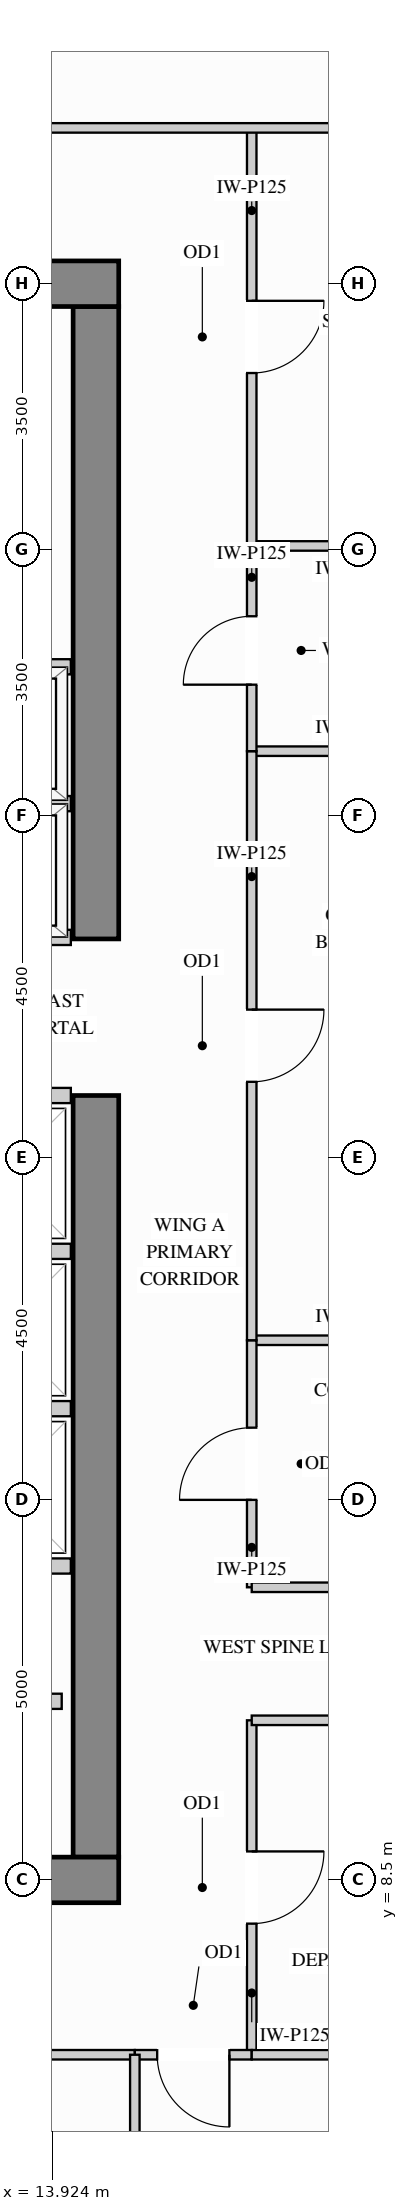
"""IFC4 building model, lengths in metres.
Left out: names, types, materials, properties, quantities, classifications, styles, units other than length and angle.
Written with IfcOpenShell. Run it as: python <this file> out.ifc"""

import sys

from ifc_helpers import new_model, si_unit, direction, frame, frame_2d, origin, place, context, subcontext, project, spatial, rectangle, extrude, source, transform, mapped, element, fill, save


model = new_model("IFC4")
c1 = context("Model", 3, precision=1e-05, world=origin(), true_north=direction((0.0, 1.0)))
c2 = subcontext(c1, "Body", "Model", "MODEL_VIEW")
j1 = project(units=[si_unit("LENGTHUNIT", "METRE"), si_unit("PLANEANGLEUNIT", "RADIAN")], contexts=[c1])
p1 = place(None, origin())
s1 = spatial("IfcSite", under=j1, at=p1, CompositionType="ELEMENT")
p2 = place(p1, origin())
s2 = spatial("IfcBuilding", under=s1, at=p2, CompositionType="ELEMENT")
p3 = place(p2, frame((0.0, 0.0, 204.3)))
s3 = spatial("IfcBuildingStorey", under=s2, at=p3, CompositionType="ELEMENT", Elevation=204.3)
m1 = source(origin(), c2, "Body", "SweptSolid", [
    extrude(rectangle(XDim=10.02, YDim=0.6, at=frame_2d((5.01, 0.0))), origin(), (0.0, 0.0, 1.0), 3.32),
])
p4 = place(p3, frame((14.5, 8.8, 0.0), z_axis=(0.0, 0.0, 1.0), x_axis=(0.0, 1.0, 0.0)))
e1 = element("IfcWall", 1, at=p4, inside=s3, PredefinedType="SHEAR", context=c2, shape_type="MappedRepresentation", body=[
    mapped(m1, transform((0.0, 0.0, 0.0), x_axis=(1.0, 0.0, 0.0), y_axis=(0.0, 1.0, 0.0), z_axis=(0.0, 0.0, 1.0))),
])
m2 = source(origin(), c2, "Body", "SweptSolid", [
    extrude(rectangle(XDim=8.32, YDim=0.6, at=frame_2d((4.16, 0.0))), origin(), (0.0, 0.0, 1.0), 3.32),
])
p5 = place(p3, frame((14.5, 20.88, 0.0), z_axis=(0.0, 0.0, 1.0), x_axis=(0.0, 1.0, 0.0)))
e2 = element("IfcWall", 2, at=p5, inside=s3, PredefinedType="SHEAR", context=c2, shape_type="MappedRepresentation", body=[
    mapped(m2, transform((0.0, 0.0, 0.0), x_axis=(1.0, 0.0, 0.0), y_axis=(0.0, 1.0, 0.0), z_axis=(0.0, 0.0, 1.0))),
])
m3 = source(origin(), c2, "Body", "SweptSolid", [
    extrude(rectangle(XDim=10.6, YDim=0.6, at=frame_2d((5.3, 0.0))), origin(), (0.0, 0.0, 1.0), 3.32),
])
for number, where, z_axis, x_axis in (
    (3, (4.2, 29.5, 0.0), (0.0, 0.0, 1.0), (1.0, 0.0, 0.0)),
    (4, (4.2, 8.5, 0.0), (0.0, 0.0, 1.0), (1.0, 0.0, 0.0)),
):
    element("IfcWall", number, at=place(p3, frame(where, z_axis=z_axis, x_axis=x_axis)), inside=s3, PredefinedType="SHEAR", context=c2, shape_type="MappedRepresentation", body=[
        mapped(m3, transform((0.0, 0.0, 0.0), x_axis=(1.0, 0.0, 0.0), y_axis=(0.0, 1.0, 0.0), z_axis=(0.0, 0.0, 1.0))),
    ])
m4 = source(origin(), c2, "Body", "SweptSolid", [
    extrude(rectangle(XDim=2.6, YDim=0.125, at=frame_2d((1.3, 0.0))), origin(), (0.0, 0.0, 1.0), 3.305),
])
p6 = place(p3, frame((16.55, 15.6, 0.0), z_axis=(0.0, 0.0, 1.0), x_axis=(1.0, 0.0, 0.0)))
e5 = element("IfcWall", 5, at=p6, inside=s3, PredefinedType="PARTITIONING", context=c2, shape_type="MappedRepresentation", body=[
    mapped(m4, transform((0.0, 0.0, 0.0), x_axis=(1.0, 0.0, 0.0), y_axis=(0.0, 1.0, 0.0), z_axis=(0.0, 0.0, 1.0))),
])
m5 = source(origin(), c2, "Body", "SweptSolid", [
    extrude(rectangle(XDim=2.598, YDim=0.125, at=frame_2d((1.299, 0.0))), origin(), (0.0, 0.0, 1.0), 3.305),
])
for number, where, z_axis, x_axis in (
    (6, (16.55, 23.35, 0.0), (0.0, 0.0, 1.0), (1.0, 0.0, 0.0)),
    (7, (16.55, 26.05, 0.0), (0.0, 0.0, 1.0), (1.0, 0.0, 0.0)),
):
    element("IfcWall", number, at=place(p3, frame(where, z_axis=z_axis, x_axis=x_axis)), inside=s3, PredefinedType="PARTITIONING", context=c2, shape_type="MappedRepresentation", body=[
        mapped(m5, transform((0.0, 0.0, 0.0), x_axis=(1.0, 0.0, 0.0), y_axis=(0.0, 1.0, 0.0), z_axis=(0.0, 0.0, 1.0))),
    ])
p7 = place(p3, frame((16.55, 12.35, 0.0), z_axis=(0.0, 0.0, 1.0), x_axis=(0.0, 1.0, 0.0)))
e8 = element("IfcWall", 8, at=p7, inside=s3, PredefinedType="PARTITIONING", context=c2, shape_type="SweptSolid", body=[
    extrude(rectangle(XDim=3.25, YDim=0.125, at=frame_2d((1.625, 0.0))), origin(), (0.0, 0.0, 1.0), 3.305),
])
p8 = place(p7, frame((1.15, 0.0, 0.0)))
e9 = element("IfcOpeningElement", 9, at=p8, cuts=e8, PredefinedType="OPENING", context=c2, shape_type="SweptSolid", body=[
    extrude(rectangle(XDim=0.95, YDim=2.15, at=frame_2d((0.475, 1.075))), frame((0.0, 0.073, 0.0), z_axis=(0.0, -1.0, 0.0), x_axis=(1.0, 0.0, 0.0)), (0.0, 0.0, 1.0), 0.145),
])
p9 = place(p3, frame((16.55, 15.6, 0.0), z_axis=(0.0, 0.0, 1.0), x_axis=(0.0, 1.0, 0.0)))
e10 = element("IfcWall", 10, at=p9, inside=s3, PredefinedType="PARTITIONING", context=c2, shape_type="SweptSolid", body=[
    extrude(rectangle(XDim=7.75, YDim=0.125, at=frame_2d((3.875, 0.0))), origin(), (0.0, 0.0, 1.0), 3.305),
])
p10 = place(p9, frame((3.4, 0.0, 0.0)))
e11 = element("IfcOpeningElement", 11, at=p10, cuts=e10, PredefinedType="OPENING", context=c2, shape_type="SweptSolid", body=[
    extrude(rectangle(XDim=0.95, YDim=2.15, at=frame_2d((0.475, 1.075))), frame((0.0, 0.073, 0.0), z_axis=(0.0, -1.0, 0.0), x_axis=(1.0, 0.0, 0.0)), (0.0, 0.0, 1.0), 0.145),
])
p11 = place(p3, frame((16.55, 26.05, 0.0), z_axis=(0.0, 0.0, 1.0), x_axis=(0.0, 1.0, 0.0)))
e12 = element("IfcWall", 12, at=p11, inside=s3, PredefinedType="PARTITIONING", context=c2, shape_type="SweptSolid", body=[
    extrude(rectangle(XDim=5.5, YDim=0.125, at=frame_2d((2.75, 0.0))), origin(), (0.0, 0.0, 1.0), 3.305),
])
p12 = place(p11, frame((2.275, 0.0, 0.0)))
e13 = element("IfcOpeningElement", 13, at=p12, cuts=e12, PredefinedType="OPENING", context=c2, shape_type="SweptSolid", body=[
    extrude(rectangle(XDim=0.95, YDim=2.15, at=frame_2d((0.475, 1.075))), frame((0.0, 0.073, 0.0), z_axis=(0.0, -1.0, 0.0), x_axis=(1.0, 0.0, 0.0)), (0.0, 0.0, 1.0), 0.145),
])
p13 = place(p3, frame((16.55, 6.2, 0.0), z_axis=(0.0, 0.0, 1.0), x_axis=(0.0, 1.0, 0.0)))
e14 = element("IfcWall", 14, at=p13, inside=s3, PredefinedType="PARTITIONING", context=c2, shape_type="SweptSolid", body=[
    extrude(rectangle(XDim=4.4, YDim=0.125, at=frame_2d((2.2, 0.0))), origin(), (0.0, 0.0, 1.0), 3.305),
])
p14 = place(p13, frame((1.725, 0.0, 0.0)))
e15 = element("IfcOpeningElement", 15, at=p14, cuts=e14, PredefinedType="OPENING", context=c2, shape_type="SweptSolid", body=[
    extrude(rectangle(XDim=0.95, YDim=2.15, at=frame_2d((0.475, 1.075))), frame((0.0, 0.073, 0.0), z_axis=(0.0, -1.0, 0.0), x_axis=(1.0, 0.0, 0.0)), (0.0, 0.0, 1.0), 0.145),
])
p15 = place(p3, frame((16.55, 23.35, 0.0), z_axis=(0.0, 0.0, 1.0), x_axis=(0.0, 1.0, 0.0)))
e16 = element("IfcWall", 16, at=p15, inside=s3, PredefinedType="PARTITIONING", context=c2, shape_type="SweptSolid", body=[
    extrude(rectangle(XDim=2.7, YDim=0.125, at=frame_2d((1.35, 0.0))), origin(), (0.0, 0.0, 1.0), 3.305),
])
p16 = place(p15, frame((0.875, 0.0, 0.0)))
e17 = element("IfcOpeningElement", 17, at=p16, cuts=e16, PredefinedType="OPENING", context=c2, shape_type="SweptSolid", body=[
    extrude(rectangle(XDim=0.9, YDim=2.15, at=frame_2d((0.45, 1.075))), frame((0.0, 0.073, 0.0), z_axis=(0.0, -1.0, 0.0), x_axis=(1.0, 0.0, 0.0)), (0.0, 0.0, 1.0), 0.145),
])
m6 = source(origin(), c2, "Body", "SweptSolid", [
    extrude(rectangle(XDim=12.598, YDim=0.125, at=frame_2d((6.299, 0.0))), origin(), (0.0, 0.0, 1.0), 3.305),
])
p17 = place(p3, frame((6.55, 31.55, 0.0), z_axis=(0.0, 0.0, 1.0), x_axis=(1.0, 0.0, 0.0)))
e18 = element("IfcWall", 18, at=p17, inside=s3, PredefinedType="PARTITIONING", context=c2, shape_type="MappedRepresentation", body=[
    mapped(m6, transform((0.0, 0.0, 0.0), x_axis=(1.0, 0.0, 0.0), y_axis=(0.0, 1.0, 0.0), z_axis=(0.0, 0.0, 1.0))),
])
m7 = source(origin(), c2, "Body", "SweptSolid", [
    extrude(rectangle(XDim=2.95, YDim=0.125, at=frame_2d((1.475, 0.0))), origin(), (0.0, 0.0, 1.0), 3.305),
])
for number, where, z_axis, x_axis in (
    (19, (16.55, 12.35, 0.0), (0.0, 0.0, 1.0), (1.0, 0.0, 0.0)),
    (20, (16.55, 10.6, 0.0), (0.0, 0.0, 1.0), (1.0, 0.0, 0.0)),
):
    element("IfcWall", number, at=place(p3, frame(where, z_axis=z_axis, x_axis=x_axis)), inside=s3, PredefinedType="PARTITIONING", context=c2, shape_type="MappedRepresentation", body=[
        mapped(m7, transform((0.0, 0.0, 0.0), x_axis=(1.0, 0.0, 0.0), y_axis=(0.0, 1.0, 0.0), z_axis=(0.0, 0.0, 1.0))),
    ])
p18 = place(p3, frame((10.875, 6.2, 0.0), z_axis=(0.0, 0.0, 1.0), x_axis=(1.0, 0.0, 0.0)))
e21 = element("IfcWall", 21, at=p18, inside=s3, PredefinedType="PARTITIONING", context=c2, shape_type="SweptSolid", body=[
    extrude(rectangle(XDim=4.137, YDim=0.125, at=frame_2d((2.068, 0.0))), origin(), (0.0, 0.0, 1.0), 2.768),
])
p19 = place(p18, frame((1.594, 0.0, 0.0)))
e22 = element("IfcOpeningElement", 22, at=p19, cuts=e21, PredefinedType="OPENING", context=c2, shape_type="SweptSolid", body=[
    extrude(rectangle(XDim=0.95, YDim=2.15, at=frame_2d((0.475, 1.075))), frame((0.0, 0.073, 0.0), z_axis=(0.0, -1.0, 0.0), x_axis=(1.0, 0.0, 0.0)), (0.0, 0.0, 1.0), 0.145),
])
p20 = place(p3, frame((15.012, 6.2, 0.0), z_axis=(0.0, 0.0, 1.0), x_axis=(1.0, 0.0, 0.0)))
e23 = element("IfcWall", 23, at=p20, inside=s3, PredefinedType="PARTITIONING", context=c2, shape_type="SweptSolid", body=[
    extrude(rectangle(XDim=1.538, YDim=0.125, at=frame_2d((0.769, 0.0))), origin(), (0.0, 0.0, 1.0), 2.768),
])
p21 = place(p20, frame((0.294, 0.0, 0.0)))
e24 = element("IfcOpeningElement", 24, at=p21, cuts=e23, PredefinedType="OPENING", context=c2, shape_type="SweptSolid", body=[
    extrude(rectangle(XDim=0.95, YDim=2.15, at=frame_2d((0.475, 1.075))), frame((0.0, 0.073, 0.0), z_axis=(0.0, -1.0, 0.0), x_axis=(1.0, 0.0, 0.0)), (0.0, 0.0, 1.0), 0.145),
])
m8 = source(origin(), c2, "Body", "SweptSolid", [
    extrude(rectangle(XDim=2.598, YDim=0.125, at=frame_2d((1.299, 0.0))), origin(), (0.0, 0.0, 1.0), 2.768),
])
p22 = place(p3, frame((16.55, 6.2, 0.0), z_axis=(0.0, 0.0, 1.0), x_axis=(1.0, 0.0, 0.0)))
e25 = element("IfcWall", 25, at=p22, inside=s3, PredefinedType="PARTITIONING", context=c2, shape_type="MappedRepresentation", body=[
    mapped(m8, transform((0.0, 0.0, 0.0), x_axis=(1.0, 0.0, 0.0), y_axis=(0.0, 1.0, 0.0), z_axis=(0.0, 0.0, 1.0))),
])
m9 = source(origin(), c2, "Body", "SweptSolid", [
    extrude(rectangle(XDim=5.08, YDim=0.125, at=frame_2d((2.54, 0.0))), origin(), (0.0, 0.0, 1.0), 3.305),
])
p23 = place(p3, frame((15.012, 1.12, 0.0), z_axis=(0.0, 0.0, 1.0), x_axis=(0.0, 1.0, 0.0)))
e26 = element("IfcWall", 26, at=p23, inside=s3, PredefinedType="PARTITIONING", context=c2, shape_type="MappedRepresentation", body=[
    mapped(m9, transform((0.0, 0.0, 0.0), x_axis=(1.0, 0.0, 0.0), y_axis=(0.0, 1.0, 0.0), z_axis=(0.0, 0.0, 1.0))),
])
m10 = source(origin(), c2, "Body", "SweptSolid", [
    extrude(rectangle(XDim=1.63, YDim=0.2, at=frame_2d((0.815, 0.0))), origin(), (0.0, 0.0, 1.0), 3.305),
])
p24 = place(p3, frame((12.42, 10.85, 0.0), z_axis=(0.0, 0.0, 1.0), x_axis=(1.0, 0.0, 0.0)))
e27 = element("IfcWall", 27, at=p24, inside=s3, PredefinedType="PARTITIONING", context=c2, shape_type="MappedRepresentation", body=[
    mapped(m10, transform((0.0, 0.0, 0.0), x_axis=(1.0, 0.0, 0.0), y_axis=(0.0, 1.0, 0.0), z_axis=(0.0, 0.0, 1.0))),
])
m11 = source(origin(), c2, "Body", "SweptSolid", [
    extrude(rectangle(XDim=2.34, YDim=0.2, at=frame_2d((1.17, 0.0))), origin(), (0.0, 0.0, 1.0), 3.305),
])
for number, where, z_axis, x_axis in (
    (28, (11.83, 22.66, 0.0), (0.0, 0.0, 1.0), (1.0, 0.0, 0.0)),
    (29, (11.83, 20.9, 0.0), (0.0, 0.0, 1.0), (1.0, 0.0, 0.0)),
    (30, (11.83, 24.46, 0.0), (0.0, 0.0, 1.0), (1.0, 0.0, 0.0)),
):
    element("IfcWall", number, at=place(p3, frame(where, z_axis=z_axis, x_axis=x_axis)), inside=s3, PredefinedType="PARTITIONING", context=c2, shape_type="MappedRepresentation", body=[
        mapped(m11, transform((0.0, 0.0, 0.0), x_axis=(1.0, 0.0, 0.0), y_axis=(0.0, 1.0, 0.0), z_axis=(0.0, 0.0, 1.0))),
    ])
m12 = source(origin(), c2, "Body", "SweptSolid", [
    extrude(rectangle(XDim=1.94, YDim=0.2, at=frame_2d((0.97, 0.0))), origin(), (0.0, 0.0, 1.0), 3.305),
])
for number, where, z_axis, x_axis in (
    (31, (12.23, 14.7, 0.0), (0.0, 0.0, 1.0), (1.0, 0.0, 0.0)),
    (32, (12.23, 12.63, 0.0), (0.0, 0.0, 1.0), (1.0, 0.0, 0.0)),
    (33, (12.23, 16.77, 0.0), (0.0, 0.0, 1.0), (1.0, 0.0, 0.0)),
    (34, (12.23, 18.82, 0.0), (0.0, 0.0, 1.0), (1.0, 0.0, 0.0)),
):
    element("IfcWall", number, at=place(p3, frame(where, z_axis=z_axis, x_axis=x_axis)), inside=s3, PredefinedType="PARTITIONING", context=c2, shape_type="MappedRepresentation", body=[
        mapped(m12, transform((0.0, 0.0, 0.0), x_axis=(1.0, 0.0, 0.0), y_axis=(0.0, 1.0, 0.0), z_axis=(0.0, 0.0, 1.0))),
    ])
m13 = source(origin(), c2, "Body", "SweptSolid", [
    extrude(rectangle(XDim=0.95, YDim=2.15, at=frame_2d((0.475, 1.075))), frame((0.0, 0.025, 0.0), z_axis=(0.0, -1.0, 0.0), x_axis=(1.0, 0.0, 0.0)), (0.0, 0.0, 1.0), 0.05),
])
p25 = place(p14, origin())
e35 = element("IfcDoor", 35, at=p25, inside=s3, OperationType="SINGLE_SWING_RIGHT", PredefinedType="DOOR", context=c2, shape_type="MappedRepresentation", body=[
    mapped(m13, transform((0.0, 0.0, 0.0), x_axis=(1.0, 0.0, 0.0), y_axis=(0.0, 1.0, 0.0), z_axis=(0.0, 0.0, 1.0))),
])
fill(e15, e35)
p26 = place(p8, origin())
e36 = element("IfcDoor", 36, at=p26, inside=s3, OperationType="SINGLE_SWING_LEFT", PredefinedType="DOOR", context=c2, shape_type="MappedRepresentation", body=[
    mapped(m13, transform((0.0, 0.0, 0.0), x_axis=(1.0, 0.0, 0.0), y_axis=(0.0, 1.0, 0.0), z_axis=(0.0, 0.0, 1.0))),
])
fill(e9, e36)
p27 = place(p10, origin())
e37 = element("IfcDoor", 37, at=p27, inside=s3, OperationType="SINGLE_SWING_RIGHT", PredefinedType="DOOR", context=c2, shape_type="MappedRepresentation", body=[
    mapped(m13, transform((0.0, 0.0, 0.0), x_axis=(1.0, 0.0, 0.0), y_axis=(0.0, 1.0, 0.0), z_axis=(0.0, 0.0, 1.0))),
])
fill(e11, e37)
p28 = place(p12, origin())
e38 = element("IfcDoor", 38, at=p28, inside=s3, OperationType="SINGLE_SWING_RIGHT", PredefinedType="DOOR", context=c2, shape_type="MappedRepresentation", body=[
    mapped(m13, transform((0.0, 0.0, 0.0), x_axis=(1.0, 0.0, 0.0), y_axis=(0.0, 1.0, 0.0), z_axis=(0.0, 0.0, 1.0))),
])
fill(e13, e38)
p29 = place(p21, origin())
e39 = element("IfcDoor", 39, at=p29, inside=s3, OperationType="SINGLE_SWING_RIGHT", PredefinedType="DOOR", context=c2, shape_type="MappedRepresentation", body=[
    mapped(m13, transform((0.0, 0.0, 0.0), x_axis=(1.0, 0.0, 0.0), y_axis=(0.0, 1.0, 0.0), z_axis=(0.0, 0.0, 1.0))),
])
fill(e24, e39)
m14 = source(origin(), c2, "Body", "SweptSolid", [
    extrude(rectangle(XDim=0.9, YDim=2.15, at=frame_2d((0.45, 1.075))), frame((0.0, 0.025, 0.0), z_axis=(0.0, -1.0, 0.0), x_axis=(1.0, 0.0, 0.0)), (0.0, 0.0, 1.0), 0.05),
])
p30 = place(p16, origin())
e40 = element("IfcDoor", 40, at=p30, inside=s3, OperationType="SINGLE_SWING_LEFT", PredefinedType="DOOR", context=c2, shape_type="MappedRepresentation", body=[
    mapped(m14, transform((0.0, 0.0, 0.0), x_axis=(1.0, 0.0, 0.0), y_axis=(0.0, 1.0, 0.0), z_axis=(0.0, 0.0, 1.0))),
])
fill(e17, e40)
save(model, sys.argv[1])
